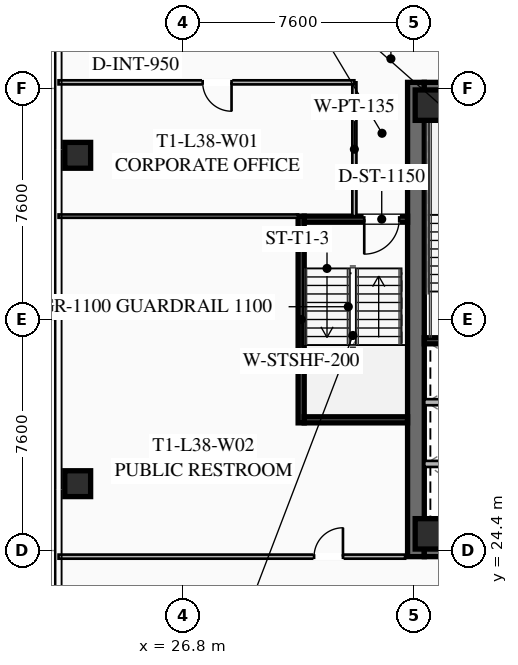
"""IFC4 building model, lengths in metres.
Left out: names, types, materials, properties, quantities, classifications, styles, units other than length and angle.
Written with IfcOpenShell. Run it as: python <this file> out.ifc"""

import sys

from ifc_helpers import new_model, si_unit, direction, frame, frame_2d, origin, origin_2d, place, context, subcontext, project, spatial, rectangle, hollow_rectangle, extrude, element, fill, save


model = new_model("IFC4")
c1 = context("Model", 3, precision=1e-05, world=origin(), true_north=direction((0.0, 1.0)))
c2 = subcontext(c1, "Body", "Model", "MODEL_VIEW")
j1 = project(units=[si_unit("LENGTHUNIT", "METRE"), si_unit("PLANEANGLEUNIT", "RADIAN")], contexts=[c1])
p1 = place(None, origin())
s1 = spatial("IfcSite", under=j1, at=p1, CompositionType="ELEMENT")
p2 = place(p1, origin())
s2 = spatial("IfcBuilding", under=s1, at=p2, CompositionType="ELEMENT")
p3 = place(p2, frame((0.0, 0.0, 142.8)))
s3 = spatial("IfcBuildingStorey", under=s2, at=p3, CompositionType="ELEMENT", Elevation=142.8)
p4 = place(p3, frame((34.475, 24.2, 0.0), z_axis=(0.0, 0.0, 1.0), x_axis=(0.0, 1.0, 0.0)))
e1 = element("IfcWall", 1, at=p4, inside=s3, PredefinedType="SHEAR", context=c2, shape_type="SweptSolid", body=[
    extrude(rectangle(XDim=15.6, YDim=0.55, at=frame_2d((7.8, 0.0))), origin(), (0.0, 0.0, 1.0), 3.55),
])
p5 = place(p3, frame((49.25, 24.475, 0.0), z_axis=(0.0, 0.0, 1.0), x_axis=(-1.0, 0.0, 0.0)))
e2 = element("IfcWall", 2, at=p5, inside=s3, PredefinedType="SHEAR", context=c2, shape_type="SweptSolid", body=[
    extrude(rectangle(XDim=14.5, YDim=0.55, at=frame_2d((7.25, 0.0))), origin(), (0.0, 0.0, 1.0), 3.55),
])
p6 = place(p5, frame((8.95, 0.0, 0.0)))
e3 = element("IfcOpeningElement", 3, at=p6, cuts=e2, PredefinedType="OPENING", context=c2, shape_type="SweptSolid", body=[
    extrude(rectangle(XDim=1.25, YDim=2.25, at=frame_2d((0.625, 1.125))), frame((0.0, 0.285, 0.0), z_axis=(0.0, -1.0, 0.0), x_axis=(1.0, 0.0, 0.0)), (0.0, 0.0, 1.0), 0.57),
])
p7 = place(p5, frame((3.9, 0.0, 0.0)))
e4 = element("IfcOpeningElement", 4, at=p7, cuts=e2, PredefinedType="OPENING", context=c2, shape_type="SweptSolid", body=[
    extrude(rectangle(XDim=1.25, YDim=2.25, at=frame_2d((0.625, 1.125))), frame((0.0, 0.285, 0.0), z_axis=(0.0, -1.0, 0.0), x_axis=(1.0, 0.0, 0.0)), (0.0, 0.0, 1.0), 0.57),
])
p8 = place(p3, frame((34.75, 39.525, 0.0), z_axis=(0.0, 0.0, 1.0), x_axis=(1.0, 0.0, 0.0)))
e5 = element("IfcWall", 5, at=p8, inside=s3, PredefinedType="SHEAR", context=c2, shape_type="SweptSolid", body=[
    extrude(rectangle(XDim=14.5, YDim=0.55, at=frame_2d((7.25, 0.0))), origin(), (0.0, 0.0, 1.0), 3.55),
])
p9 = place(p8, frame((4.3, 0.0, 0.0)))
e6 = element("IfcOpeningElement", 6, at=p9, cuts=e5, PredefinedType="OPENING", context=c2, shape_type="SweptSolid", body=[
    extrude(rectangle(XDim=1.25, YDim=2.25, at=frame_2d((0.625, 1.125))), frame((0.0, 0.285, 0.0), z_axis=(0.0, -1.0, 0.0), x_axis=(1.0, 0.0, 0.0)), (0.0, 0.0, 1.0), 0.57),
])
p10 = place(p8, frame((9.35, 0.0, 0.0)))
e7 = element("IfcOpeningElement", 7, at=p10, cuts=e5, PredefinedType="OPENING", context=c2, shape_type="SweptSolid", body=[
    extrude(rectangle(XDim=1.25, YDim=2.25, at=frame_2d((0.625, 1.125))), frame((0.0, 0.285, 0.0), z_axis=(0.0, -1.0, 0.0), x_axis=(1.0, 0.0, 0.0)), (0.0, 0.0, 1.0), 0.57),
])
for number, where, z_axis, x_axis in (
    (8, (34.95, 24.95, 0.0), (0.0, 0.0, 1.0), (1.0, 0.0, 0.0)),
    (9, (34.95, 39.05, 0.0), (0.0, 0.0, 1.0), (1.0, 0.0, 0.0)),
):
    element("IfcColumn", number, at=place(p3, frame(where, z_axis=z_axis, x_axis=x_axis)), inside=s3, PredefinedType="COLUMN", context=c2, shape_type="SweptSolid", body=[
        extrude(hollow_rectangle(XDim=1.0, YDim=1.0, WallThickness=0.04, at=origin_2d()), origin(), (0.0, 0.0, 1.0), 3.37),
    ])
for number, where, z_axis, x_axis in (
    (10, (23.35, 37.4, 0.0), (0.0, 0.0, 1.0), (1.0, 0.0, 0.0)),
    (11, (23.35, 26.6, 0.0), (0.0, 0.0, 1.0), (1.0, 0.0, 0.0)),
):
    element("IfcColumn", number, at=place(p3, frame(where, z_axis=z_axis, x_axis=x_axis)), inside=s3, PredefinedType="COLUMN", context=c2, shape_type="SweptSolid", body=[
        extrude(hollow_rectangle(XDim=0.85, YDim=0.85, WallThickness=0.035, at=origin_2d()), origin(), (0.0, 0.0, 1.0), 3.37),
    ])
for number, where, z_axis, x_axis in (
    (12, (34.75, 31.3, 0.0), (0.0, 0.0, 1.0), (1.0, 0.0, 0.0)),
    (13, (34.75, 38.7, 0.0), (0.0, 0.0, 1.0), (1.0, 0.0, 0.0)),
):
    element("IfcWall", number, at=place(p3, frame(where, z_axis=z_axis, x_axis=x_axis)), inside=s3, PredefinedType="SHEAR", context=c2, shape_type="SweptSolid", body=[
        extrude(rectangle(XDim=3.55, YDim=0.2, at=frame_2d((1.775, 0.0))), origin(), (0.0, 0.0, 1.0), 3.37),
    ])
for number, where, z_axis, x_axis in (
    (14, (34.75, 27.25, 0.0), (0.0, 0.0, 1.0), (1.0, 0.0, 0.0)),
    (15, (34.75, 29.28, 0.0), (0.0, 0.0, 1.0), (1.0, 0.0, 0.0)),
):
    element("IfcWall", number, at=place(p3, frame(where, z_axis=z_axis, x_axis=x_axis)), inside=s3, PredefinedType="SOLIDWALL", context=c2, shape_type="SweptSolid", body=[
        extrude(rectangle(XDim=3.2, YDim=0.2, at=frame_2d((1.6, 0.0))), origin(), (0.0, 0.0, 1.0), 3.37),
    ])
p11 = place(p3, frame((30.7, 28.6, 0.0), z_axis=(0.0, 0.0, 1.0), x_axis=(0.0, 1.0, 0.0)))
e16 = element("IfcWall", 16, at=p11, inside=s3, PredefinedType="SHEAR", context=c2, shape_type="SweptSolid", body=[
    extrude(rectangle(XDim=6.8, YDim=0.2, at=frame_2d((3.4, 0.0))), origin(), (0.0, 0.0, 1.0), 3.37),
])
p12 = place(p3, frame((34.2, 35.3, 0.0), z_axis=(0.0, 0.0, 1.0), x_axis=(-1.0, 0.0, 0.0)))
e17 = element("IfcWall", 17, at=p12, inside=s3, PredefinedType="SHEAR", context=c2, shape_type="SweptSolid", body=[
    extrude(rectangle(XDim=3.4, YDim=0.2, at=frame_2d((1.7, 0.0))), origin(), (0.0, 0.0, 1.0), 3.37),
])
p13 = place(p12, frame((0.275, 0.0, 0.0)))
e18 = element("IfcOpeningElement", 18, at=p13, cuts=e17, PredefinedType="OPENING", context=c2, shape_type="SweptSolid", body=[
    extrude(rectangle(XDim=1.15, YDim=2.2, at=frame_2d((0.575, 1.1))), frame((0.0, 0.11, 0.0), z_axis=(0.0, -1.0, 0.0), x_axis=(1.0, 0.0, 0.0)), (0.0, 0.0, 1.0), 0.22),
])
p14 = place(p3, frame((30.8, 28.7, 0.0), z_axis=(0.0, 0.0, 1.0), x_axis=(1.0, 0.0, 0.0)))
e19 = element("IfcWall", 19, at=p14, inside=s3, PredefinedType="SHEAR", context=c2, shape_type="SweptSolid", body=[
    extrude(rectangle(XDim=3.4, YDim=0.2, at=frame_2d((1.7, 0.0))), origin(), (0.0, 0.0, 1.0), 3.37),
])
p15 = place(p3, frame((32.45, 35.4, 0.0), z_axis=(0.0, 0.0, 1.0), x_axis=(0.0, 1.0, 0.0)))
e20 = element("IfcWall", 20, at=p15, inside=s3, PredefinedType="PARTITIONING", context=c2, shape_type="SweptSolid", body=[
    extrude(rectangle(XDim=4.4, YDim=0.135, at=frame_2d((2.2, 0.0))), origin(), (0.0, 0.0, 1.0), 2.723),
])
p16 = place(p3, frame((32.45, 39.8, 0.0), z_axis=(0.0, 0.0, 1.0), x_axis=(-1.0, 0.0, 0.0)))
e21 = element("IfcWall", 21, at=p16, inside=s3, PredefinedType="PARTITIONING", context=c2, shape_type="SweptSolid", body=[
    extrude(rectangle(XDim=9.73, YDim=0.135, at=frame_2d((4.865, 0.0))), origin(), (0.0, 0.0, 1.0), 2.723),
])
p17 = place(p16, frame((4.04, 0.0, 0.0)))
e22 = element("IfcOpeningElement", 22, at=p17, cuts=e21, PredefinedType="OPENING", context=c2, shape_type="SweptSolid", body=[
    extrude(rectangle(XDim=0.95, YDim=2.05, at=frame_2d((0.475, 1.025))), frame((0.0, 0.077, 0.0), z_axis=(0.0, -1.0, 0.0), x_axis=(1.0, 0.0, 0.0)), (0.0, 0.0, 1.0), 0.155),
])
p18 = place(p3, frame((22.72, 24.2, 0.0), z_axis=(0.0, 0.0, 1.0), x_axis=(1.0, 0.0, 0.0)))
e23 = element("IfcWall", 23, at=p18, inside=s3, PredefinedType="PARTITIONING", context=c2, shape_type="SweptSolid", body=[
    extrude(rectangle(XDim=11.4, YDim=0.135, at=frame_2d((5.7, 0.0))), origin(), (0.0, 0.0, 1.0), 2.723),
])
p19 = place(p18, frame((8.405, 0.0, 0.0)))
e24 = element("IfcOpeningElement", 24, at=p19, cuts=e23, PredefinedType="OPENING", context=c2, shape_type="SweptSolid", body=[
    extrude(rectangle(XDim=0.95, YDim=2.05, at=frame_2d((0.475, 1.025))), frame((0.0, 0.077, 0.0), z_axis=(0.0, -1.0, 0.0), x_axis=(1.0, 0.0, 0.0)), (0.0, 0.0, 1.0), 0.155),
])
p20 = place(p3, frame((30.6, 35.4, 0.0), z_axis=(0.0, 0.0, 1.0), x_axis=(-1.0, 0.0, 0.0)))
e25 = element("IfcWall", 25, at=p20, inside=s3, PredefinedType="PARTITIONING", context=c2, shape_type="SweptSolid", body=[
    extrude(rectangle(XDim=7.88, YDim=0.11, at=frame_2d((3.94, 0.0))), origin(), (0.0, 0.0, 1.0), 2.723),
])
p21 = place(p13, origin())
e26 = element("IfcDoor", 26, at=p21, inside=s3, OperationType="SINGLE_SWING_RIGHT", PredefinedType="DOOR", context=c2, shape_type="SweptSolid", body=[
    extrude(rectangle(XDim=1.15, YDim=2.2, at=frame_2d((0.575, 1.1))), frame((0.0, 0.025, 0.0), z_axis=(0.0, -1.0, 0.0), x_axis=(1.0, 0.0, 0.0)), (0.0, 0.0, 1.0), 0.05),
])
fill(e18, e26)
p22 = place(p17, origin())
e27 = element("IfcDoor", 27, at=p22, inside=s3, OperationType="SINGLE_SWING_LEFT", PredefinedType="DOOR", context=c2, shape_type="SweptSolid", body=[
    extrude(rectangle(XDim=0.95, YDim=2.05, at=frame_2d((0.475, 1.025))), frame((0.0, 0.025, 0.0), z_axis=(0.0, -1.0, 0.0), x_axis=(1.0, 0.0, 0.0)), (0.0, 0.0, 1.0), 0.05),
])
fill(e22, e27)
p23 = place(p19, origin())
e28 = element("IfcDoor", 28, at=p23, inside=s3, OperationType="SINGLE_SWING_RIGHT", PredefinedType="DOOR", context=c2, shape_type="SweptSolid", body=[
    extrude(rectangle(XDim=0.95, YDim=2.05, at=frame_2d((0.475, 1.025))), frame((0.0, 0.025, 0.0), z_axis=(0.0, -1.0, 0.0), x_axis=(1.0, 0.0, 0.0)), (0.0, 0.0, 1.0), 0.05),
])
fill(e24, e28)
save(model, sys.argv[1])
